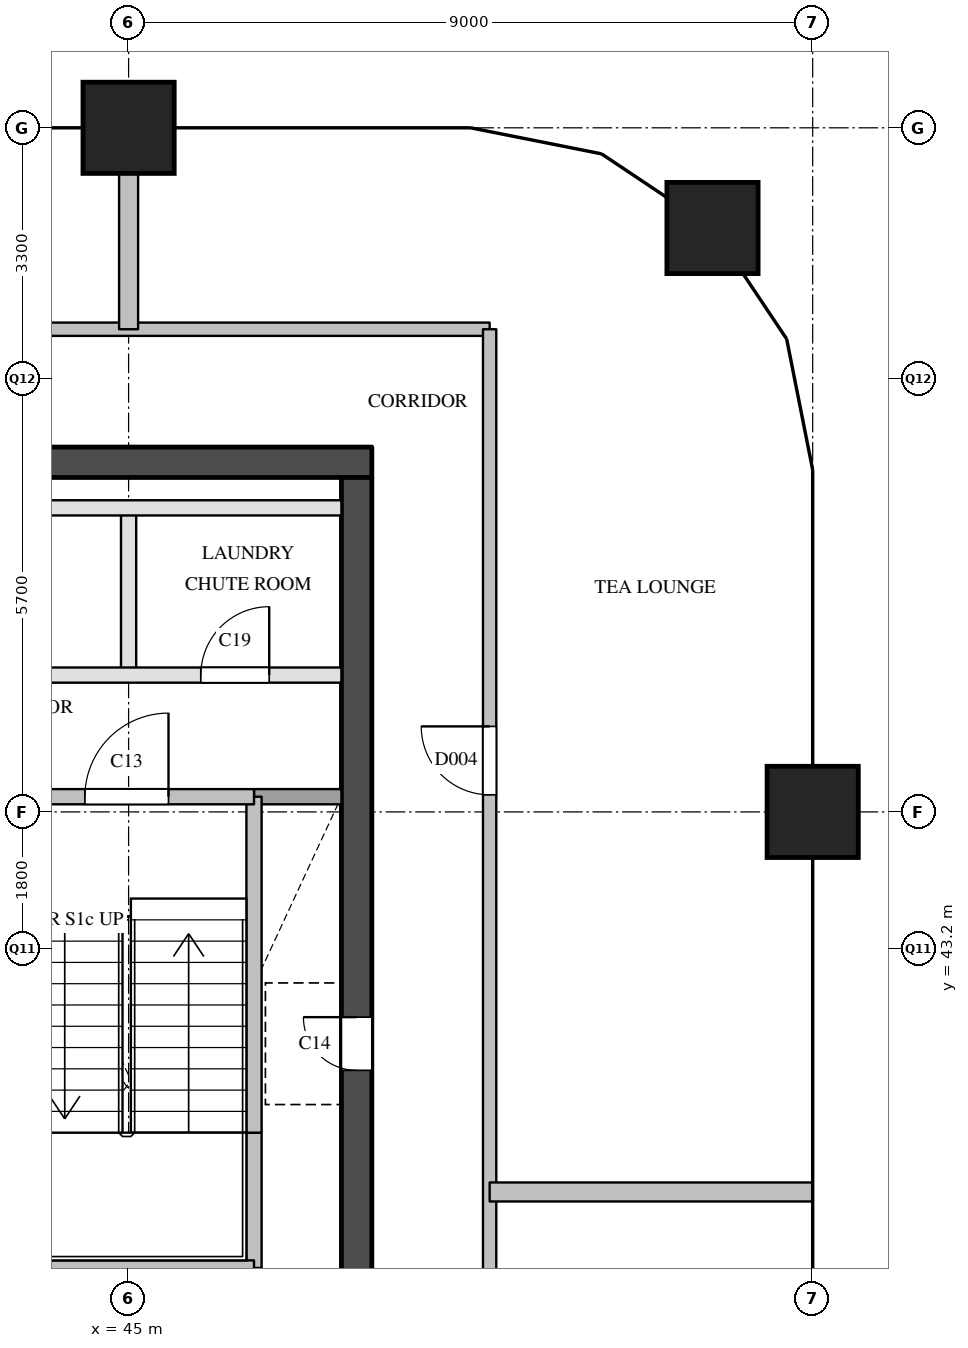
"""IFC4 building model, lengths in metres.
Left out: names, types, materials, properties, quantities, classifications, styles, units other than length and angle.
Written with IfcOpenShell. Run it as: python <this file> out.ifc"""

import sys

from ifc_helpers import new_model, si_unit, direction, frame, frame_2d, origin, origin_2d, place, context, subcontext, project, spatial, rectangle, extrude, element, fill, save


model = new_model("IFC4")
c1 = context("Model", 3, precision=1e-05, world=origin(), true_north=direction((0.0, 1.0)))
c2 = subcontext(c1, "Body", "Model", "MODEL_VIEW")
j1 = project(units=[si_unit("LENGTHUNIT", "METRE"), si_unit("PLANEANGLEUNIT", "RADIAN")], contexts=[c1])
p1 = place(None, origin())
s1 = spatial("IfcSite", under=j1, at=p1, CompositionType="ELEMENT")
p2 = place(p1, origin())
s2 = spatial("IfcBuilding", under=s1, at=p2, CompositionType="ELEMENT")
p3 = place(p2, frame((0.0, 0.0, 261.8)))
s3 = spatial("IfcBuildingStorey", under=s2, at=p3, CompositionType="ELEMENT", Elevation=261.8)
for number, where, z_axis, x_axis in (
    (1, (45.0, 54.0, 0.0), (0.0, 0.0, 1.0), (1.0, 0.0, 0.0)),
    (2, (54.0, 45.0, 0.0), (0.0, 0.0, 1.0), (1.0, 0.0, 0.0)),
    (3, (52.682, 52.682, 0.0), (0.0, 0.0, 1.0), (1.0, 0.0, 0.0)),
):
    element("IfcColumn", number, at=place(p3, frame(where, z_axis=z_axis, x_axis=x_axis)), inside=s3, PredefinedType="COLUMN", context=c2, shape_type="SweptSolid", body=[
        extrude(rectangle(XDim=1.2, YDim=1.2, at=origin_2d()), origin(), (0.0, 0.0, 1.0), 3.9),
    ])
p4 = place(p3, frame((36.2, 49.6, 0.0), z_axis=(0.0, 0.0, 1.0), x_axis=(1.0, 0.0, 0.0)))
e4 = element("IfcWall", 4, at=p4, inside=s3, PredefinedType="SHEAR", context=c2, shape_type="SweptSolid", body=[
    extrude(rectangle(XDim=12.0, YDim=0.4, at=frame_2d((6.0, 0.0))), origin(), (0.0, 0.0, 1.0), 3.6),
])
p5 = place(p3, frame((48.0, 29.1, 0.0), z_axis=(0.0, 0.0, 1.0), x_axis=(0.0, 1.0, 0.0)))
e5 = element("IfcWall", 5, at=p5, inside=s3, PredefinedType="SHEAR", context=c2, shape_type="SweptSolid", body=[
    extrude(rectangle(XDim=20.3, YDim=0.4, at=frame_2d((10.15, 0.0))), origin(), (0.0, 0.0, 1.0), 3.6),
])
p6 = place(p5, frame((12.5, 0.0, 0.0)))
e6 = element("IfcOpeningElement", 6, at=p6, cuts=e5, PredefinedType="OPENING", context=c2, shape_type="SweptSolid", body=[
    extrude(rectangle(XDim=0.7, YDim=2.1, at=frame_2d((0.35, 1.05))), frame((0.0, 0.21, 0.0), z_axis=(0.0, -1.0, 0.0), x_axis=(1.0, 0.0, 0.0)), (0.0, 0.0, 1.0), 0.42),
])
p7 = place(p5, frame((3.9, 0.0, 0.0)))
e7 = element("IfcOpeningElement", 7, at=p7, cuts=e5, PredefinedType="OPENING", context=c2, shape_type="SweptSolid", body=[
    extrude(rectangle(XDim=1.8, YDim=2.1, at=frame_2d((0.9, 1.05))), frame((0.0, 0.21, 0.0), z_axis=(0.0, -1.0, 0.0), x_axis=(1.0, 0.0, 0.0)), (0.0, 0.0, 1.0), 0.42),
])
p8 = place(p3, frame((45.0, 46.8, 0.0), z_axis=(0.0, 0.0, 1.0), x_axis=(0.0, 1.0, 0.0)))
e8 = element("IfcWall", 8, at=p8, inside=s3, PredefinedType="PARTITIONING", context=c2, shape_type="SweptSolid", body=[
    extrude(rectangle(XDim=2.2, YDim=0.2, at=frame_2d((1.1, 0.0))), origin(), (0.0, 0.0, 1.0), 3.6),
])
p9 = place(p3, frame((46.65, 39.0, 0.0), z_axis=(0.0, 0.0, 1.0), x_axis=(0.0, 1.0, 0.0)))
e9 = element("IfcWall", 9, at=p9, inside=s3, PredefinedType="SOLIDWALL", context=c2, shape_type="SweptSolid", body=[
    extrude(rectangle(XDim=1.78, YDim=0.2, at=frame_2d((0.89, 0.0))), origin(), (0.0, 0.0, 1.0), 3.6),
])
p10 = place(p3, frame((46.65, 40.78, 0.0), z_axis=(0.0, 0.0, 1.0), x_axis=(0.0, 1.0, 0.0)))
e10 = element("IfcWall", 10, at=p10, inside=s3, PredefinedType="SOLIDWALL", context=c2, shape_type="SweptSolid", body=[
    extrude(rectangle(XDim=4.42, YDim=0.2, at=frame_2d((2.21, 0.0))), origin(), (0.0, 0.0, 1.0), 3.6),
])
p11 = place(p3, frame((43.4, 39.0, 0.0), z_axis=(0.0, 0.0, 1.0), x_axis=(1.0, 0.0, 0.0)))
e11 = element("IfcWall", 11, at=p11, inside=s3, PredefinedType="SOLIDWALL", context=c2, shape_type="SweptSolid", body=[
    extrude(rectangle(XDim=3.25, YDim=0.2, at=frame_2d((1.625, 0.0))), origin(), (0.0, 0.0, 1.0), 3.6),
])
p12 = place(p3, frame((46.65, 45.2, 0.0), z_axis=(0.0, 0.0, 1.0), x_axis=(1.0, 0.0, 0.0)))
e12 = element("IfcWall", 12, at=p12, inside=s3, PredefinedType="SOLIDWALL", context=c2, shape_type="SweptSolid", body=[
    extrude(rectangle(XDim=1.15, YDim=0.2, at=frame_2d((0.575, 0.0))), origin(), (0.0, 0.0, 1.0), 3.6),
])
p13 = place(p3, frame((36.6, 45.2, 0.0), z_axis=(0.0, 0.0, 1.0), x_axis=(1.0, 0.0, 0.0)))
e13 = element("IfcWall", 13, at=p13, inside=s3, PredefinedType="SOLIDWALL", context=c2, shape_type="SweptSolid", body=[
    extrude(rectangle(XDim=10.05, YDim=0.2, at=frame_2d((5.025, 0.0))), origin(), (0.0, 0.0, 1.0), 3.6),
])
p14 = place(p13, frame((1.125, 0.0, 0.0)))
e14 = element("IfcOpeningElement", 14, at=p14, cuts=e13, PredefinedType="OPENING", context=c2, shape_type="SweptSolid", body=[
    extrude(rectangle(XDim=1.1, YDim=2.1, at=frame_2d((0.55, 1.05))), frame((0.0, 0.11, 0.0), z_axis=(0.0, -1.0, 0.0), x_axis=(1.0, 0.0, 0.0)), (0.0, 0.0, 1.0), 0.22),
])
p15 = place(p13, frame((4.475, 0.0, 0.0)))
e15 = element("IfcOpeningElement", 15, at=p15, cuts=e13, PredefinedType="OPENING", context=c2, shape_type="SweptSolid", body=[
    extrude(rectangle(XDim=1.1, YDim=2.1, at=frame_2d((0.55, 1.05))), frame((0.0, 0.11, 0.0), z_axis=(0.0, -1.0, 0.0), x_axis=(1.0, 0.0, 0.0)), (0.0, 0.0, 1.0), 0.22),
])
p16 = place(p13, frame((7.825, 0.0, 0.0)))
e16 = element("IfcOpeningElement", 16, at=p16, cuts=e13, PredefinedType="OPENING", context=c2, shape_type="SweptSolid", body=[
    extrude(rectangle(XDim=1.1, YDim=2.1, at=frame_2d((0.55, 1.05))), frame((0.0, 0.11, 0.0), z_axis=(0.0, -1.0, 0.0), x_axis=(1.0, 0.0, 0.0)), (0.0, 0.0, 1.0), 0.22),
])
p17 = place(p3, frame((36.6, 46.8, 0.0), z_axis=(0.0, 0.0, 1.0), x_axis=(1.0, 0.0, 0.0)))
e17 = element("IfcWall", 17, at=p17, inside=s3, PredefinedType="PARTITIONING", context=c2, shape_type="SweptSolid", body=[
    extrude(rectangle(XDim=11.2, YDim=0.2, at=frame_2d((5.6, 0.0))), origin(), (0.0, 0.0, 1.0), 3.6),
])
p18 = place(p17, frame((3.75, 0.0, 0.0)))
e18 = element("IfcOpeningElement", 18, at=p18, cuts=e17, PredefinedType="OPENING", context=c2, shape_type="SweptSolid", body=[
    extrude(rectangle(XDim=0.9, YDim=2.1, at=frame_2d((0.45, 1.05))), frame((0.0, 0.11, 0.0), z_axis=(0.0, -1.0, 0.0), x_axis=(1.0, 0.0, 0.0)), (0.0, 0.0, 1.0), 0.22),
])
p19 = place(p17, frame((9.35, 0.0, 0.0)))
e19 = element("IfcOpeningElement", 19, at=p19, cuts=e17, PredefinedType="OPENING", context=c2, shape_type="SweptSolid", body=[
    extrude(rectangle(XDim=0.9, YDim=2.1, at=frame_2d((0.45, 1.05))), frame((0.0, 0.11, 0.0), z_axis=(0.0, -1.0, 0.0), x_axis=(1.0, 0.0, 0.0)), (0.0, 0.0, 1.0), 0.22),
])
p20 = place(p3, frame((36.6, 49.0, 0.0), z_axis=(0.0, 0.0, 1.0), x_axis=(1.0, 0.0, 0.0)))
e20 = element("IfcWall", 20, at=p20, inside=s3, PredefinedType="PARTITIONING", context=c2, shape_type="SweptSolid", body=[
    extrude(rectangle(XDim=11.2, YDim=0.2, at=frame_2d((5.6, 0.0))), origin(), (0.0, 0.0, 1.0), 3.6),
])
p21 = place(p3, frame((34.65, 51.35, 0.0), z_axis=(0.0, 0.0, 1.0), x_axis=(1.0, 0.0, 0.0)))
e21 = element("IfcWall", 21, at=p21, inside=s3, PredefinedType="PARTITIONING", context=c2, shape_type="SweptSolid", body=[
    extrude(rectangle(XDim=15.1, YDim=0.175, at=frame_2d((7.55, 0.0))), origin(), (0.0, 0.0, 1.0), 3.6),
])
p22 = place(p21, frame((2.4, 0.0, 0.0)))
e22 = element("IfcOpeningElement", 22, at=p22, cuts=e21, PredefinedType="OPENING", context=c2, shape_type="SweptSolid", body=[
    extrude(rectangle(XDim=0.9, YDim=2.1, at=frame_2d((0.45, 1.05))), frame((0.0, 0.097, 0.0), z_axis=(0.0, -1.0, 0.0), x_axis=(1.0, 0.0, 0.0)), (0.0, 0.0, 1.0), 0.195),
])
p23 = place(p21, frame((7.35, 0.0, 0.0)))
e23 = element("IfcOpeningElement", 23, at=p23, cuts=e21, PredefinedType="OPENING", context=c2, shape_type="SweptSolid", body=[
    extrude(rectangle(XDim=1.0, YDim=2.1, at=frame_2d((0.5, 1.05))), frame((0.0, 0.097, 0.0), z_axis=(0.0, -1.0, 0.0), x_axis=(1.0, 0.0, 0.0)), (0.0, 0.0, 1.0), 0.195),
])
p24 = place(p3, frame((49.75, 28.5, 0.0), z_axis=(0.0, 0.0, 1.0), x_axis=(0.0, 1.0, 0.0)))
e24 = element("IfcWall", 24, at=p24, inside=s3, PredefinedType="PARTITIONING", context=c2, shape_type="SweptSolid", body=[
    extrude(rectangle(XDim=22.85, YDim=0.175, at=frame_2d((11.425, 0.0))), origin(), (0.0, 0.0, 1.0), 3.6),
])
p25 = place(p24, frame((5.3, 0.0, 0.0)))
e25 = element("IfcOpeningElement", 25, at=p25, cuts=e24, PredefinedType="OPENING", context=c2, shape_type="SweptSolid", body=[
    extrude(rectangle(XDim=0.9, YDim=2.1, at=frame_2d((0.45, 1.05))), frame((0.0, 0.097, 0.0), z_axis=(0.0, -1.0, 0.0), x_axis=(1.0, 0.0, 0.0)), (0.0, 0.0, 1.0), 0.195),
])
p26 = place(p24, frame((16.725, 0.0, 0.0)))
e26 = element("IfcOpeningElement", 26, at=p26, cuts=e24, PredefinedType="OPENING", context=c2, shape_type="SweptSolid", body=[
    extrude(rectangle(XDim=0.9, YDim=2.1, at=frame_2d((0.45, 1.05))), frame((0.0, 0.097, 0.0), z_axis=(0.0, -1.0, 0.0), x_axis=(1.0, 0.0, 0.0)), (0.0, 0.0, 1.0), 0.195),
])
p27 = place(p3, frame((49.75, 40.0, 0.0), z_axis=(0.0, 0.0, 1.0), x_axis=(1.0, 0.0, 0.0)))
e27 = element("IfcWall", 27, at=p27, inside=s3, PredefinedType="PARTITIONING", context=c2, shape_type="SweptSolid", body=[
    extrude(rectangle(XDim=4.25, YDim=0.25, at=frame_2d((2.125, 0.0))), origin(), (0.0, 0.0, 1.0), 2.6),
])
p28 = place(p3, frame((45.0, 51.35, 0.0), z_axis=(0.0, 0.0, 1.0), x_axis=(0.0, 1.0, 0.0)))
e28 = element("IfcWall", 28, at=p28, inside=s3, PredefinedType="PARTITIONING", context=c2, shape_type="SweptSolid", body=[
    extrude(rectangle(XDim=2.65, YDim=0.25, at=frame_2d((1.325, 0.0))), origin(), (0.0, 0.0, 1.0), 3.6),
])
p29 = place(p16, origin())
e29 = element("IfcDoor", 29, at=p29, inside=s3, OperationType="SINGLE_SWING_RIGHT", PredefinedType="DOOR", context=c2, shape_type="SweptSolid", body=[
    extrude(rectangle(XDim=1.1, YDim=2.1, at=frame_2d((0.55, 1.05))), frame((0.0, 0.025, 0.0), z_axis=(0.0, -1.0, 0.0), x_axis=(1.0, 0.0, 0.0)), (0.0, 0.0, 1.0), 0.05),
])
fill(e16, e29)
p30 = place(p6, origin())
e30 = element("IfcDoor", 30, at=p30, inside=s3, OperationType="SINGLE_SWING_RIGHT", PredefinedType="DOOR", context=c2, shape_type="SweptSolid", body=[
    extrude(rectangle(XDim=0.7, YDim=2.1, at=frame_2d((0.35, 1.05))), frame((0.0, 0.025, 0.0), z_axis=(0.0, -1.0, 0.0), x_axis=(1.0, 0.0, 0.0)), (0.0, 0.0, 1.0), 0.05),
])
fill(e6, e30)
p31 = place(p19, origin())
e31 = element("IfcDoor", 31, at=p31, inside=s3, OperationType="SINGLE_SWING_RIGHT", PredefinedType="DOOR", context=c2, shape_type="SweptSolid", body=[
    extrude(rectangle(XDim=0.9, YDim=2.1, at=frame_2d((0.45, 1.05))), frame((0.0, 0.025, 0.0), z_axis=(0.0, -1.0, 0.0), x_axis=(1.0, 0.0, 0.0)), (0.0, 0.0, 1.0), 0.05),
])
fill(e19, e31)
p32 = place(p26, origin())
e32 = element("IfcDoor", 32, at=p32, inside=s3, OperationType="SINGLE_SWING_RIGHT", PredefinedType="DOOR", context=c2, shape_type="SweptSolid", body=[
    extrude(rectangle(XDim=0.9, YDim=2.1, at=frame_2d((0.45, 1.05))), frame((0.0, 0.025, 0.0), z_axis=(0.0, -1.0, 0.0), x_axis=(1.0, 0.0, 0.0)), (0.0, 0.0, 1.0), 0.05),
])
fill(e26, e32)
save(model, sys.argv[1])
